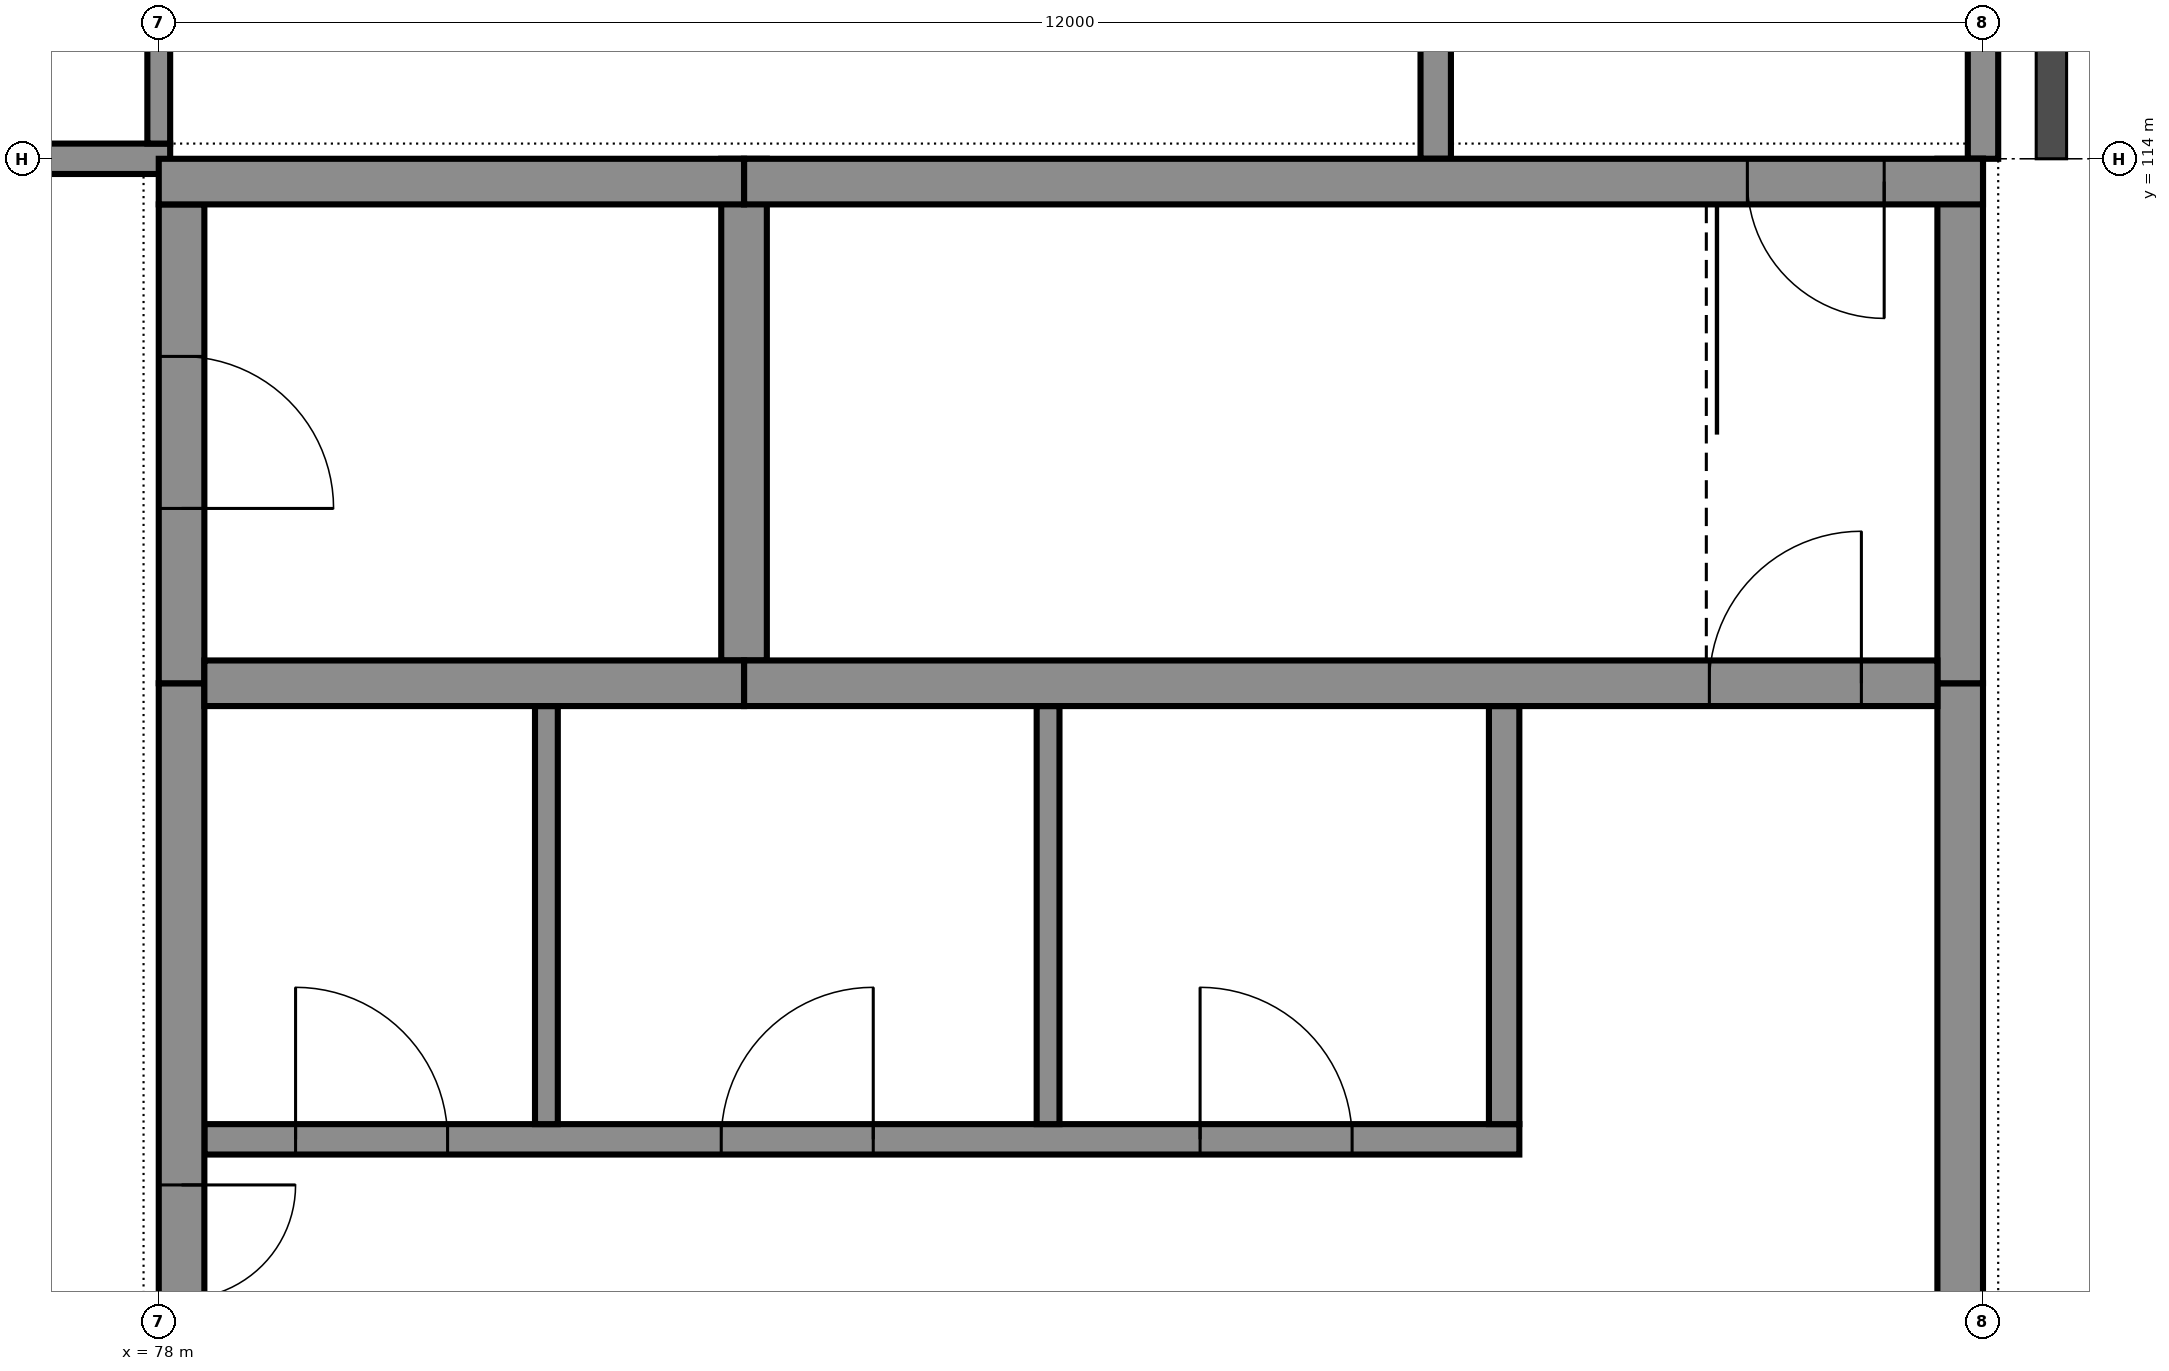
"""IFC4 building model, lengths in metres.
Left out: names, types, materials, properties, quantities, classifications, styles, units other than length and angle.
Written with IfcOpenShell. Run it as: python <this file> out.ifc"""

import sys

from ifc_helpers import new_model, si_unit, direction, frame, frame_2d, origin, place, context, subcontext, project, spatial, rectangle, extrude, element, fill, save


model = new_model("IFC4")
c1 = context("Model", 3, precision=1e-05, world=origin(), true_north=direction((0.0, 1.0)))
c2 = subcontext(c1, "Body", "Model", "MODEL_VIEW")
j1 = project(units=[si_unit("LENGTHUNIT", "METRE"), si_unit("PLANEANGLEUNIT", "RADIAN")], contexts=[c1])
p1 = place(None, origin())
s1 = spatial("IfcSite", under=j1, at=p1, CompositionType="ELEMENT")
p2 = place(p1, origin())
s2 = spatial("IfcBuilding", under=s1, at=p2, CompositionType="ELEMENT")
p3 = place(p2, frame((0.0, 0.0, 12.0)))
s3 = spatial("IfcBuildingStorey", under=s2, at=p3, CompositionType="ELEMENT", Elevation=12.0)
p4 = place(p3, frame((90.0, 113.85, 0.0), z_axis=(0.0, 0.0, 1.0), x_axis=(-1.0, 0.0, 0.0)))
e1 = element("IfcWall", 1, at=p4, inside=s3, PredefinedType="SHEAR", context=c2, shape_type="SweptSolid", body=[
    extrude(rectangle(XDim=8.15, YDim=0.3, at=frame_2d((4.075, 0.0))), origin(), (0.0, 0.0, 1.0), 5.0),
])
p5 = place(p4, frame((0.65, 0.0, 0.0)))
e2 = element("IfcOpeningElement", 2, at=p5, cuts=e1, PredefinedType="OPENING", context=c2, shape_type="SweptSolid", body=[
    extrude(rectangle(XDim=0.9, YDim=2.1, at=frame_2d((0.45, 1.05))), frame((0.0, 0.16, 0.0), z_axis=(0.0, -1.0, 0.0), x_axis=(1.0, 0.0, 0.0)), (0.0, 0.0, 1.0), 0.32),
])
p6 = place(p3, frame((81.85, 113.85, 0.0), z_axis=(0.0, 0.0, 1.0), x_axis=(-1.0, 0.0, 0.0)))
e3 = element("IfcWall", 3, at=p6, inside=s3, PredefinedType="SHEAR", context=c2, shape_type="SweptSolid", body=[
    extrude(rectangle(XDim=3.85, YDim=0.3, at=frame_2d((1.925, 0.0))), origin(), (0.0, 0.0, 1.0), 5.0),
])
p7 = place(p3, frame((89.7, 110.55, 0.0), z_axis=(0.0, 0.0, 1.0), x_axis=(-1.0, 0.0, 0.0)))
e4 = element("IfcWall", 4, at=p7, inside=s3, PredefinedType="SHEAR", context=c2, shape_type="SweptSolid", body=[
    extrude(rectangle(XDim=7.85, YDim=0.3, at=frame_2d((3.925, 0.0))), origin(), (0.0, 0.0, 1.0), 5.0),
])
p8 = place(p7, frame((0.5, 0.0, 0.0)))
e5 = element("IfcOpeningElement", 5, at=p8, cuts=e4, PredefinedType="OPENING", context=c2, shape_type="SweptSolid", body=[
    extrude(rectangle(XDim=1.0, YDim=2.1, at=frame_2d((0.5, 1.05))), frame((0.0, 0.16, 0.0), z_axis=(0.0, -1.0, 0.0), x_axis=(1.0, 0.0, 0.0)), (0.0, 0.0, 1.0), 0.32),
])
p9 = place(p3, frame((81.85, 110.55, 0.0), z_axis=(0.0, 0.0, 1.0), x_axis=(-1.0, 0.0, 0.0)))
e6 = element("IfcWall", 6, at=p9, inside=s3, PredefinedType="SHEAR", context=c2, shape_type="SweptSolid", body=[
    extrude(rectangle(XDim=3.55, YDim=0.3, at=frame_2d((1.775, 0.0))), origin(), (0.0, 0.0, 1.0), 5.0),
])
p10 = place(p3, frame((89.85, 105.45, 0.0), z_axis=(0.0, 0.0, 1.0), x_axis=(0.0, 1.0, 0.0)))
e7 = element("IfcWall", 7, at=p10, inside=s3, PredefinedType="SHEAR", context=c2, shape_type="SweptSolid", body=[
    extrude(rectangle(XDim=5.1, YDim=0.3, at=frame_2d((2.55, 0.0))), origin(), (0.0, 0.0, 1.0), 5.0),
])
p11 = place(p3, frame((89.85, 110.55, 0.0), z_axis=(0.0, 0.0, 1.0), x_axis=(0.0, 1.0, 0.0)))
e8 = element("IfcWall", 8, at=p11, inside=s3, PredefinedType="SHEAR", context=c2, shape_type="SweptSolid", body=[
    extrude(rectangle(XDim=3.45, YDim=0.3, at=frame_2d((1.725, 0.0))), origin(), (0.0, 0.0, 1.0), 5.0),
])
p12 = place(p3, frame((78.15, 105.45, 0.0), z_axis=(0.0, 0.0, 1.0), x_axis=(0.0, 1.0, 0.0)))
e9 = element("IfcWall", 9, at=p12, inside=s3, PredefinedType="SHEAR", context=c2, shape_type="SweptSolid", body=[
    extrude(rectangle(XDim=5.1, YDim=0.3, at=frame_2d((2.55, 0.0))), origin(), (0.0, 0.0, 1.0), 5.0),
])
p13 = place(p12, frame((0.3, 0.0, 0.0)))
e10 = element("IfcOpeningElement", 10, at=p13, cuts=e9, PredefinedType="OPENING", context=c2, shape_type="SweptSolid", body=[
    extrude(rectangle(XDim=1.5, YDim=2.1, at=frame_2d((0.75, 1.05))), frame((0.0, 0.16, 0.0), z_axis=(0.0, -1.0, 0.0), x_axis=(1.0, 0.0, 0.0)), (0.0, 0.0, 1.0), 0.32),
])
p14 = place(p3, frame((78.15, 110.55, 0.0), z_axis=(0.0, 0.0, 1.0), x_axis=(0.0, 1.0, 0.0)))
e11 = element("IfcWall", 11, at=p14, inside=s3, PredefinedType="SHEAR", context=c2, shape_type="SweptSolid", body=[
    extrude(rectangle(XDim=3.15, YDim=0.3, at=frame_2d((1.575, 0.0))), origin(), (0.0, 0.0, 1.0), 5.0),
])
p15 = place(p14, frame((1.15, 0.0, 0.0)))
e12 = element("IfcOpeningElement", 12, at=p15, cuts=e11, PredefinedType="OPENING", context=c2, shape_type="SweptSolid", body=[
    extrude(rectangle(XDim=1.0, YDim=2.1, at=frame_2d((0.5, 1.05))), frame((0.0, 0.16, 0.0), z_axis=(0.0, -1.0, 0.0), x_axis=(1.0, 0.0, 0.0)), (0.0, 0.0, 1.0), 0.32),
])
p16 = place(p3, frame((81.85, 110.7, 0.0), z_axis=(0.0, 0.0, 1.0), x_axis=(0.0, 1.0, 0.0)))
e13 = element("IfcWall", 13, at=p16, inside=s3, PredefinedType="SHEAR", context=c2, shape_type="SweptSolid", body=[
    extrude(rectangle(XDim=3.3, YDim=0.3, at=frame_2d((1.65, 0.0))), origin(), (0.0, 0.0, 1.0), 5.0),
])
p17 = place(p3, frame((78.3, 107.55, 0.0), z_axis=(0.0, 0.0, 1.0), x_axis=(1.0, 0.0, 0.0)))
e14 = element("IfcWall", 14, at=p17, inside=s3, PredefinedType="PARTITIONING", context=c2, shape_type="SweptSolid", body=[
    extrude(rectangle(XDim=8.65, YDim=0.2, at=frame_2d((4.325, 0.0))), origin(), (0.0, 0.0, 1.0), 4.825),
])
p18 = place(p17, frame((0.6, 0.0, 0.0)))
e15 = element("IfcOpeningElement", 15, at=p18, cuts=e14, PredefinedType="OPENING", context=c2, shape_type="SweptSolid", body=[
    extrude(rectangle(XDim=1.0, YDim=2.1, at=frame_2d((0.5, 1.05))), frame((0.0, 0.11, 0.0), z_axis=(0.0, -1.0, 0.0), x_axis=(1.0, 0.0, 0.0)), (0.0, 0.0, 1.0), 0.22),
])
p19 = place(p17, frame((3.4, 0.0, 0.0)))
e16 = element("IfcOpeningElement", 16, at=p19, cuts=e14, PredefinedType="OPENING", context=c2, shape_type="SweptSolid", body=[
    extrude(rectangle(XDim=1.0, YDim=2.1, at=frame_2d((0.5, 1.05))), frame((0.0, 0.11, 0.0), z_axis=(0.0, -1.0, 0.0), x_axis=(1.0, 0.0, 0.0)), (0.0, 0.0, 1.0), 0.22),
])
p20 = place(p17, frame((6.55, 0.0, 0.0)))
e17 = element("IfcOpeningElement", 17, at=p20, cuts=e14, PredefinedType="OPENING", context=c2, shape_type="SweptSolid", body=[
    extrude(rectangle(XDim=1.0, YDim=2.1, at=frame_2d((0.5, 1.05))), frame((0.0, 0.11, 0.0), z_axis=(0.0, -1.0, 0.0), x_axis=(1.0, 0.0, 0.0)), (0.0, 0.0, 1.0), 0.22),
])
p21 = place(p3, frame((71.9, 114.0, 0.0), z_axis=(0.0, 0.0, 1.0), x_axis=(1.0, 0.0, 0.0)))
e18 = element("IfcWall", 18, at=p21, inside=s3, PredefinedType="PARTITIONING", context=c2, shape_type="SweptSolid", body=[
    extrude(rectangle(XDim=6.175, YDim=0.2, at=frame_2d((3.087, 0.0))), origin(), (0.0, 0.0, 1.0), 4.825),
])
p22 = place(p3, frame((78.0, 114.1, 0.0), z_axis=(0.0, 0.0, 1.0), x_axis=(0.0, 1.0, 0.0)))
e19 = element("IfcWall", 19, at=p22, inside=s3, PredefinedType="PARTITIONING", context=c2, shape_type="SweptSolid", body=[
    extrude(rectangle(XDim=35.9, YDim=0.15, at=frame_2d((17.95, 0.0))), origin(), (0.0, 0.0, 1.0), 4.825),
])
for number, where, z_axis, x_axis in (
    (20, (80.55, 107.65, 0.0), (0.0, 0.0, 1.0), (0.0, 1.0, 0.0)),
    (21, (83.85, 107.65, 0.0), (0.0, 0.0, 1.0), (0.0, 1.0, 0.0)),
):
    element("IfcWall", number, at=place(p3, frame(where, z_axis=z_axis, x_axis=x_axis)), inside=s3, PredefinedType="PARTITIONING", context=c2, shape_type="SweptSolid", body=[
        extrude(rectangle(XDim=2.75, YDim=0.15, at=frame_2d((1.375, 0.0))), origin(), (0.0, 0.0, 1.0), 4.825),
    ])
p23 = place(p3, frame((86.4, 114.0, 0.0), z_axis=(0.0, 0.0, 1.0), x_axis=(0.0, 1.0, 0.0)))
e22 = element("IfcWall", 22, at=p23, inside=s3, PredefinedType="PARTITIONING", context=c2, shape_type="SweptSolid", body=[
    extrude(rectangle(XDim=36.0, YDim=0.2, at=frame_2d((18.0, 0.0))), origin(), (0.0, 0.0, 1.0), 4.825),
])
p24 = place(p23, frame((2.5, 0.0, 0.0)))
e23 = element("IfcOpeningElement", 23, at=p24, cuts=e22, PredefinedType="OPENING", context=c2, shape_type="SweptSolid", body=[
    extrude(rectangle(XDim=1.0, YDim=2.1, at=frame_2d((0.5, 1.05))), frame((0.0, 0.11, 0.0), z_axis=(0.0, -1.0, 0.0), x_axis=(1.0, 0.0, 0.0)), (0.0, 0.0, 1.0), 0.22),
])
p25 = place(p23, frame((8.5, 0.0, 0.0)))
e24 = element("IfcOpeningElement", 24, at=p25, cuts=e22, PredefinedType="OPENING", context=c2, shape_type="SweptSolid", body=[
    extrude(rectangle(XDim=1.0, YDim=2.1, at=frame_2d((0.5, 1.05))), frame((0.0, 0.11, 0.0), z_axis=(0.0, -1.0, 0.0), x_axis=(1.0, 0.0, 0.0)), (0.0, 0.0, 1.0), 0.22),
])
p26 = place(p23, frame((14.5, 0.0, 0.0)))
e25 = element("IfcOpeningElement", 25, at=p26, cuts=e22, PredefinedType="OPENING", context=c2, shape_type="SweptSolid", body=[
    extrude(rectangle(XDim=1.0, YDim=2.1, at=frame_2d((0.5, 1.05))), frame((0.0, 0.11, 0.0), z_axis=(0.0, -1.0, 0.0), x_axis=(1.0, 0.0, 0.0)), (0.0, 0.0, 1.0), 0.22),
])
p27 = place(p23, frame((20.5, 0.0, 0.0)))
e26 = element("IfcOpeningElement", 26, at=p27, cuts=e22, PredefinedType="OPENING", context=c2, shape_type="SweptSolid", body=[
    extrude(rectangle(XDim=1.0, YDim=2.1, at=frame_2d((0.5, 1.05))), frame((0.0, 0.11, 0.0), z_axis=(0.0, -1.0, 0.0), x_axis=(1.0, 0.0, 0.0)), (0.0, 0.0, 1.0), 0.22),
])
p28 = place(p23, frame((26.5, 0.0, 0.0)))
e27 = element("IfcOpeningElement", 27, at=p28, cuts=e22, PredefinedType="OPENING", context=c2, shape_type="SweptSolid", body=[
    extrude(rectangle(XDim=1.0, YDim=2.1, at=frame_2d((0.5, 1.05))), frame((0.0, 0.11, 0.0), z_axis=(0.0, -1.0, 0.0), x_axis=(1.0, 0.0, 0.0)), (0.0, 0.0, 1.0), 0.22),
])
p29 = place(p23, frame((32.5, 0.0, 0.0)))
e28 = element("IfcOpeningElement", 28, at=p29, cuts=e22, PredefinedType="OPENING", context=c2, shape_type="SweptSolid", body=[
    extrude(rectangle(XDim=1.0, YDim=2.1, at=frame_2d((0.5, 1.05))), frame((0.0, 0.11, 0.0), z_axis=(0.0, -1.0, 0.0), x_axis=(1.0, 0.0, 0.0)), (0.0, 0.0, 1.0), 0.22),
])
p30 = place(p3, frame((86.85, 107.65, 0.0), z_axis=(0.0, 0.0, 1.0), x_axis=(0.0, 1.0, 0.0)))
e29 = element("IfcWall", 29, at=p30, inside=s3, PredefinedType="PARTITIONING", context=c2, shape_type="SweptSolid", body=[
    extrude(rectangle(XDim=2.75, YDim=0.2, at=frame_2d((1.375, 0.0))), origin(), (0.0, 0.0, 1.0), 4.825),
])
p31 = place(p3, frame((90.0, 114.0, 0.0), z_axis=(0.0, 0.0, 1.0), x_axis=(0.0, 1.0, 0.0)))
e30 = element("IfcWall", 30, at=p31, inside=s3, PredefinedType="PARTITIONING", context=c2, shape_type="SweptSolid", body=[
    extrude(rectangle(XDim=36.0, YDim=0.2, at=frame_2d((18.0, 0.0))), origin(), (0.0, 0.0, 1.0), 4.825),
])
p32 = place(p13, frame((1.5, 0.0, 0.0), z_axis=(0.0, 0.0, 1.0), x_axis=(-1.0, 0.0, 0.0)))
e31 = element("IfcDoor", 31, at=p32, inside=s3, OperationType="DOUBLE_DOOR_SINGLE_SWING", PredefinedType="DOOR", context=c2, shape_type="SweptSolid", body=[
    extrude(rectangle(XDim=1.5, YDim=2.1, at=frame_2d((0.75, 1.05))), frame((0.0, 0.025, 0.0), z_axis=(0.0, -1.0, 0.0), x_axis=(1.0, 0.0, 0.0)), (0.0, 0.0, 1.0), 0.05),
])
fill(e10, e31)
p33 = place(p18, origin())
e32 = element("IfcDoor", 32, at=p33, inside=s3, OperationType="SINGLE_SWING_RIGHT", PredefinedType="DOOR", context=c2, shape_type="SweptSolid", body=[
    extrude(rectangle(XDim=1.0, YDim=2.1, at=frame_2d((0.5, 1.05))), frame((0.0, 0.025, 0.0), z_axis=(0.0, -1.0, 0.0), x_axis=(1.0, 0.0, 0.0)), (0.0, 0.0, 1.0), 0.05),
])
fill(e15, e32)
p34 = place(p19, origin())
e33 = element("IfcDoor", 33, at=p34, inside=s3, OperationType="SINGLE_SWING_LEFT", PredefinedType="DOOR", context=c2, shape_type="SweptSolid", body=[
    extrude(rectangle(XDim=1.0, YDim=2.1, at=frame_2d((0.5, 1.05))), frame((0.0, 0.025, 0.0), z_axis=(0.0, -1.0, 0.0), x_axis=(1.0, 0.0, 0.0)), (0.0, 0.0, 1.0), 0.05),
])
fill(e16, e33)
p35 = place(p20, origin())
e34 = element("IfcDoor", 34, at=p35, inside=s3, OperationType="SINGLE_SWING_RIGHT", PredefinedType="DOOR", context=c2, shape_type="SweptSolid", body=[
    extrude(rectangle(XDim=1.0, YDim=2.1, at=frame_2d((0.5, 1.05))), frame((0.0, 0.025, 0.0), z_axis=(0.0, -1.0, 0.0), x_axis=(1.0, 0.0, 0.0)), (0.0, 0.0, 1.0), 0.05),
])
fill(e17, e34)
p36 = place(p8, frame((1.0, 0.0, 0.0), z_axis=(0.0, 0.0, 1.0), x_axis=(-1.0, 0.0, 0.0)))
e35 = element("IfcDoor", 35, at=p36, inside=s3, OperationType="SINGLE_SWING_LEFT", PredefinedType="DOOR", context=c2, shape_type="SweptSolid", body=[
    extrude(rectangle(XDim=1.0, YDim=2.1, at=frame_2d((0.5, 1.05))), frame((0.0, 0.025, 0.0), z_axis=(0.0, -1.0, 0.0), x_axis=(1.0, 0.0, 0.0)), (0.0, 0.0, 1.0), 0.05),
])
fill(e5, e35)
p37 = place(p15, frame((1.0, 0.0, 0.0), z_axis=(0.0, 0.0, 1.0), x_axis=(-1.0, 0.0, 0.0)))
e36 = element("IfcDoor", 36, at=p37, inside=s3, OperationType="SINGLE_SWING_LEFT", PredefinedType="DOOR", context=c2, shape_type="SweptSolid", body=[
    extrude(rectangle(XDim=1.0, YDim=2.1, at=frame_2d((0.5, 1.05))), frame((0.0, 0.025, 0.0), z_axis=(0.0, -1.0, 0.0), x_axis=(1.0, 0.0, 0.0)), (0.0, 0.0, 1.0), 0.05),
])
fill(e12, e36)
p38 = place(p5, origin())
e37 = element("IfcDoor", 37, at=p38, inside=s3, OperationType="SINGLE_SWING_RIGHT", PredefinedType="DOOR", context=c2, shape_type="SweptSolid", body=[
    extrude(rectangle(XDim=0.9, YDim=2.1, at=frame_2d((0.45, 1.05))), frame((0.0, 0.025, 0.0), z_axis=(0.0, -1.0, 0.0), x_axis=(1.0, 0.0, 0.0)), (0.0, 0.0, 1.0), 0.05),
])
fill(e2, e37)
save(model, sys.argv[1])
